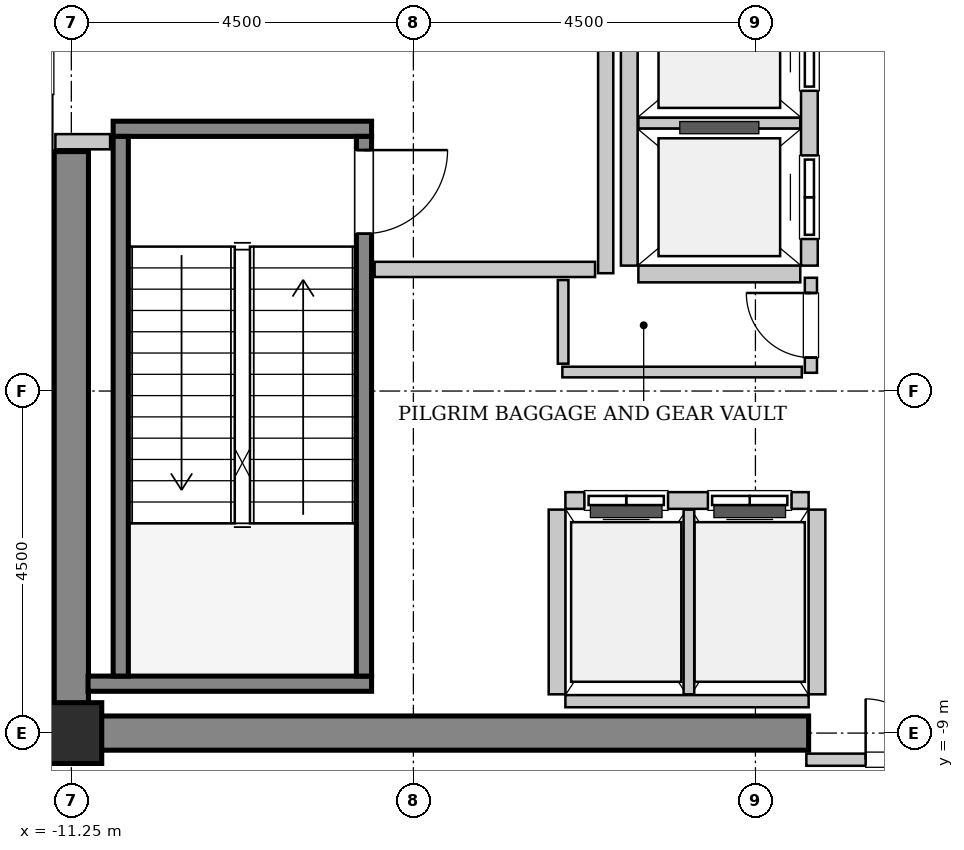
"""IFC4 building model, lengths in metres.
Left out: names, types, materials, properties, quantities, classifications, styles, units other than length and angle.
Written with IfcOpenShell. Run it as: python <this file> out.ifc"""

import sys

from ifc_helpers import new_model, si_unit, direction, frame, frame_2d, origin, origin_2d, place, context, subcontext, project, spatial, rectangle, hollow_rectangle, extrude, source, transform, mapped, element, fill, save


model = new_model("IFC4")
c1 = context("Model", 3, precision=1e-05, world=origin(), true_north=direction((0.0, 1.0)))
c2 = subcontext(c1, "Body", "Model", "MODEL_VIEW")
j1 = project(units=[si_unit("LENGTHUNIT", "METRE"), si_unit("PLANEANGLEUNIT", "RADIAN")], contexts=[c1])
p1 = place(None, origin())
s1 = spatial("IfcSite", under=j1, at=p1, CompositionType="ELEMENT")
p2 = place(p1, origin())
s2 = spatial("IfcBuilding", under=s1, at=p2, CompositionType="ELEMENT")
p3 = place(p2, frame((0.0, 0.0, 259.8)))
s3 = spatial("IfcBuildingStorey", under=s2, at=p3, CompositionType="ELEMENT", Elevation=259.8)
m1 = source(origin(), c2, "Body", "SweptSolid", [
    extrude(rectangle(XDim=9.925, YDim=0.45, at=frame_2d((4.962, 0.0))), origin(), (0.0, 0.0, 1.0), 4.8),
])
p4 = place(p3, frame((-11.475, -9.0, 0.0), z_axis=(0.0, 0.0, 1.0), x_axis=(1.0, 0.0, 0.0)))
e1 = element("IfcWall", 1, at=p4, inside=s3, PredefinedType="SHEAR", context=c2, shape_type="MappedRepresentation", body=[
    mapped(m1, transform((0.0, 0.0, 0.0), x_axis=(1.0, 0.0, 0.0), y_axis=(0.0, 1.0, 0.0), z_axis=(0.0, 0.0, 1.0), scale=1.0)),
])
m2 = source(origin(), c2, "Body", "SweptSolid", [
    extrude(rectangle(XDim=7.425, YDim=0.45, at=frame_2d((3.712, 0.0))), origin(), (0.0, 0.0, 1.0), 4.8),
])
p5 = place(p3, frame((-11.25, -8.775, 0.0), z_axis=(0.0, 0.0, 1.0), x_axis=(0.0, 1.0, 0.0)))
e2 = element("IfcWall", 2, at=p5, inside=s3, PredefinedType="SHEAR", context=c2, shape_type="MappedRepresentation", body=[
    mapped(m2, transform((0.0, 0.0, 0.0), x_axis=(1.0, 0.0, 0.0), y_axis=(0.0, 1.0, 0.0), z_axis=(0.0, 0.0, 1.0), scale=1.0)),
])
m3 = source(origin(), c2, "Body", "SweptSolid", [
    extrude(hollow_rectangle(XDim=0.8, YDim=0.8, WallThickness=0.04, InnerFilletRadius=0.04, OuterFilletRadius=0.08, at=origin_2d()), origin(), (0.0, 0.0, 1.0), 4.8),
])
p6 = place(p3, frame((-11.25, -9.0, 0.0), z_axis=(0.0, 0.0, 1.0), x_axis=(1.0, 0.0, 0.0)))
e3 = element("IfcColumn", 3, at=p6, inside=s3, PredefinedType="COLUMN", context=c2, shape_type="MappedRepresentation", body=[
    mapped(m3, transform((0.0, 0.0, 0.0), x_axis=(1.0, 0.0, 0.0), y_axis=(0.0, 1.0, 0.0), z_axis=(0.0, 0.0, 1.0), scale=1.0)),
])
m4 = source(origin(), c2, "Body", "SweptSolid", [
    extrude(rectangle(XDim=3.4, YDim=0.2, at=frame_2d((1.7, 0.0))), origin(), (0.0, 0.0, 1.0), 4.8),
])
p7 = place(p3, frame((-10.7, -1.05, 0.0), z_axis=(0.0, 0.0, 1.0), x_axis=(1.0, 0.0, 0.0)))
e4 = element("IfcWall", 4, at=p7, inside=s3, PredefinedType="SOLIDWALL", context=c2, shape_type="MappedRepresentation", body=[
    mapped(m4, transform((0.0, 0.0, 0.0), x_axis=(1.0, 0.0, 0.0), y_axis=(0.0, 1.0, 0.0), z_axis=(0.0, 0.0, 1.0), scale=1.0)),
])
m5 = source(origin(), c2, "Body", "SweptSolid", [
    extrude(rectangle(XDim=3.73, YDim=0.2, at=frame_2d((1.865, 0.0))), origin(), (0.0, 0.0, 1.0), 4.8),
])
p8 = place(p3, frame((-11.03, -8.35, 0.0), z_axis=(0.0, 0.0, 1.0), x_axis=(1.0, 0.0, 0.0)))
e5 = element("IfcWall", 5, at=p8, inside=s3, PredefinedType="SOLIDWALL", context=c2, shape_type="MappedRepresentation", body=[
    mapped(m5, transform((0.0, 0.0, 0.0), x_axis=(1.0, 0.0, 0.0), y_axis=(0.0, 1.0, 0.0), z_axis=(0.0, 0.0, 1.0), scale=1.0)),
])
m6 = source(origin(), c2, "Body", "SweptSolid", [
    extrude(rectangle(XDim=7.1, YDim=0.2, at=frame_2d((3.55, 0.0))), origin(), (0.0, 0.0, 1.0), 4.8),
])
p9 = place(p3, frame((-10.6, -1.15, 0.0), z_axis=(0.0, 0.0, 1.0), x_axis=(0.0, -1.0, 0.0)))
e6 = element("IfcWall", 6, at=p9, inside=s3, PredefinedType="SOLIDWALL", context=c2, shape_type="MappedRepresentation", body=[
    mapped(m6, transform((0.0, 0.0, 0.0), x_axis=(1.0, 0.0, 0.0), y_axis=(0.0, 1.0, 0.0), z_axis=(0.0, 0.0, 1.0), scale=1.0)),
])
p10 = place(p3, frame((-7.4, -1.15, 0.0), z_axis=(0.0, 0.0, 1.0), x_axis=(0.0, -1.0, 0.0)))
e7 = element("IfcWall", 7, at=p10, inside=s3, PredefinedType="SOLIDWALL", context=c2, shape_type="MappedRepresentation", body=[
    mapped(m6, transform((0.0, 0.0, 0.0), x_axis=(1.0, 0.0, 0.0), y_axis=(0.0, 1.0, 0.0), z_axis=(0.0, 0.0, 1.0), scale=1.0)),
])
p11 = place(p10, frame((0.18, 0.0, 0.0)))
e8 = element("IfcOpeningElement", 8, at=p11, cuts=e7, PredefinedType="OPENING", context=c2, shape_type="SweptSolid", body=[
    extrude(rectangle(XDim=1.1, YDim=2.15, at=frame_2d((0.55, 1.075))), frame((0.0, 0.11, 0.0), z_axis=(0.0, -1.0, 0.0), x_axis=(1.0, 0.0, 0.0)), (0.0, 0.0, 1.0), 0.22),
])
m7 = source(origin(), c2, "Body", "SweptSolid", [
    extrude(rectangle(XDim=3.2, YDim=0.22, at=frame_2d((1.6, 0.0))), origin(), (0.0, 0.0, 1.0), 4.535),
])
p12 = place(p3, frame((-1.55, -5.94, 0.0), z_axis=(0.0, 0.0, 1.0), x_axis=(-1.0, 0.0, 0.0)))
e9 = element("IfcWall", 9, at=p12, inside=s3, PredefinedType="SOLIDWALL", context=c2, shape_type="MappedRepresentation", body=[
    mapped(m7, transform((0.0, 0.0, 0.0), x_axis=(1.0, 0.0, 0.0), y_axis=(0.0, 1.0, 0.0), z_axis=(0.0, 0.0, 1.0), scale=1.0)),
])
p13 = place(p12, frame((1.85, 0.0, 0.0)))
e10 = element("IfcOpeningElement", 10, at=p13, cuts=e9, PredefinedType="OPENING", context=c2, shape_type="SweptSolid", body=[
    extrude(rectangle(XDim=1.1, YDim=2.2, at=frame_2d((0.55, 1.1))), frame((0.0, 0.12, 0.0), z_axis=(0.0, -1.0, 0.0), x_axis=(1.0, 0.0, 0.0)), (0.0, 0.0, 1.0), 0.24),
])
p14 = place(p12, frame((0.225, 0.0, 0.0)))
e11 = element("IfcOpeningElement", 11, at=p14, cuts=e9, PredefinedType="OPENING", context=c2, shape_type="SweptSolid", body=[
    extrude(rectangle(XDim=1.1, YDim=2.2, at=frame_2d((0.55, 1.1))), frame((0.0, 0.12, 0.0), z_axis=(0.0, -1.0, 0.0), x_axis=(1.0, 0.0, 0.0)), (0.0, 0.0, 1.0), 0.24),
])
m8 = source(origin(), c2, "Body", "SweptSolid", [
    extrude(rectangle(XDim=3.2, YDim=0.16, at=frame_2d((1.6, 0.0))), origin(), (0.0, 0.0, 1.0), 3.625),
])
p15 = place(p3, frame((-4.75, -8.58, 0.0), z_axis=(0.0, 0.0, 1.0), x_axis=(1.0, 0.0, 0.0)))
e12 = element("IfcWall", 12, at=p15, inside=s3, PredefinedType="PARTITIONING", context=c2, shape_type="MappedRepresentation", body=[
    mapped(m8, transform((0.0, 0.0, 0.0), x_axis=(1.0, 0.0, 0.0), y_axis=(0.0, 1.0, 0.0), z_axis=(0.0, 0.0, 1.0), scale=1.0)),
])
m9 = source(origin(), c2, "Body", "SweptSolid", [
    extrude(rectangle(XDim=2.43, YDim=0.22, at=frame_2d((1.215, 0.0))), origin(), (0.0, 0.0, 1.0), 4.535),
])
p16 = place(p3, frame((-4.86, -6.06, 0.0), z_axis=(0.0, 0.0, 1.0), x_axis=(0.0, -1.0, 0.0)))
e13 = element("IfcWall", 13, at=p16, inside=s3, PredefinedType="SOLIDWALL", context=c2, shape_type="MappedRepresentation", body=[
    mapped(m9, transform((0.0, 0.0, 0.0), x_axis=(1.0, 0.0, 0.0), y_axis=(0.0, 1.0, 0.0), z_axis=(0.0, 0.0, 1.0), scale=1.0)),
])
m10 = source(origin(), c2, "Body", "SweptSolid", [
    extrude(rectangle(XDim=2.43, YDim=0.14, at=frame_2d((1.215, 0.0))), origin(), (0.0, 0.0, 1.0), 4.535),
])
p17 = place(p3, frame((-3.125, -8.49, 0.0), z_axis=(0.0, 0.0, 1.0), x_axis=(0.0, 1.0, 0.0)))
e14 = element("IfcWall", 14, at=p17, inside=s3, PredefinedType="PARTITIONING", context=c2, shape_type="MappedRepresentation", body=[
    mapped(m10, transform((0.0, 0.0, 0.0), x_axis=(1.0, 0.0, 0.0), y_axis=(0.0, 1.0, 0.0), z_axis=(0.0, 0.0, 1.0), scale=1.0)),
])
p18 = place(p3, frame((-1.44, -8.49, 0.0), z_axis=(0.0, 0.0, 1.0), x_axis=(0.0, 1.0, 0.0)))
e15 = element("IfcWall", 15, at=p18, inside=s3, PredefinedType="SOLIDWALL", context=c2, shape_type="MappedRepresentation", body=[
    mapped(m9, transform((0.0, 0.0, 0.0), x_axis=(1.0, 0.0, 0.0), y_axis=(0.0, 1.0, 0.0), z_axis=(0.0, 0.0, 1.0), scale=1.0)),
])
m11 = source(origin(), c2, "Body", "SweptSolid", [
    extrude(rectangle(XDim=5.7, YDim=0.22, at=frame_2d((2.85, 0.0))), origin(), (0.0, 0.0, 1.0), 4.535),
])
p19 = place(p3, frame((-1.54, -2.85, 0.0), z_axis=(0.0, 0.0, 1.0), x_axis=(0.0, 1.0, 0.0)))
e16 = element("IfcWall", 16, at=p19, inside=s3, PredefinedType="SOLIDWALL", context=c2, shape_type="MappedRepresentation", body=[
    mapped(m11, transform((0.0, 0.0, 0.0), x_axis=(1.0, 0.0, 0.0), y_axis=(0.0, 1.0, 0.0), z_axis=(0.0, 0.0, 1.0), scale=1.0)),
])
p20 = place(p19, frame((0.35, 0.0, 0.0)))
e17 = element("IfcOpeningElement", 17, at=p20, cuts=e16, PredefinedType="OPENING", context=c2, shape_type="SweptSolid", body=[
    extrude(rectangle(XDim=1.1, YDim=2.2, at=frame_2d((0.55, 1.1))), frame((0.0, 0.12, 0.0), z_axis=(0.0, -1.0, 0.0), x_axis=(1.0, 0.0, 0.0)), (0.0, 0.0, 1.0), 0.24),
])
p21 = place(p19, frame((2.3, 0.0, 0.0)))
e18 = element("IfcOpeningElement", 18, at=p21, cuts=e16, PredefinedType="OPENING", context=c2, shape_type="SweptSolid", body=[
    extrude(rectangle(XDim=1.1, YDim=2.2, at=frame_2d((0.55, 1.1))), frame((0.0, 0.12, 0.0), z_axis=(0.0, -1.0, 0.0), x_axis=(1.0, 0.0, 0.0)), (0.0, 0.0, 1.0), 0.24),
])
p22 = place(p19, frame((4.25, 0.0, 0.0)))
e19 = element("IfcOpeningElement", 19, at=p22, cuts=e16, PredefinedType="OPENING", context=c2, shape_type="SweptSolid", body=[
    extrude(rectangle(XDim=1.1, YDim=2.2, at=frame_2d((0.55, 1.1))), frame((0.0, 0.12, 0.0), z_axis=(0.0, -1.0, 0.0), x_axis=(1.0, 0.0, 0.0)), (0.0, 0.0, 1.0), 0.24),
])
p23 = place(p3, frame((-3.91, 2.85, 0.0), z_axis=(0.0, 0.0, 1.0), x_axis=(0.0, -1.0, 0.0)))
e20 = element("IfcWall", 20, at=p23, inside=s3, PredefinedType="SOLIDWALL", context=c2, shape_type="MappedRepresentation", body=[
    mapped(m11, transform((0.0, 0.0, 0.0), x_axis=(1.0, 0.0, 0.0), y_axis=(0.0, 1.0, 0.0), z_axis=(0.0, 0.0, 1.0), scale=1.0)),
])
m12 = source(origin(), c2, "Body", "SweptSolid", [
    extrude(rectangle(XDim=2.13, YDim=0.22, at=frame_2d((1.065, 0.0))), origin(), (0.0, 0.0, 1.0), 4.535),
])
p24 = place(p3, frame((-3.79, -2.96, 0.0), z_axis=(0.0, 0.0, 1.0), x_axis=(1.0, 0.0, 0.0)))
e21 = element("IfcWall", 21, at=p24, inside=s3, PredefinedType="SOLIDWALL", context=c2, shape_type="MappedRepresentation", body=[
    mapped(m12, transform((0.0, 0.0, 0.0), x_axis=(1.0, 0.0, 0.0), y_axis=(0.0, 1.0, 0.0), z_axis=(0.0, 0.0, 1.0), scale=1.0)),
])
m13 = source(origin(), c2, "Body", "SweptSolid", [
    extrude(rectangle(XDim=2.13, YDim=0.14, at=frame_2d((1.065, 0.0))), origin(), (0.0, 0.0, 1.0), 4.535),
])
p25 = place(p3, frame((-3.79, -0.975, 0.0), z_axis=(0.0, 0.0, 1.0), x_axis=(1.0, 0.0, 0.0)))
e22 = element("IfcWall", 22, at=p25, inside=s3, PredefinedType="PARTITIONING", context=c2, shape_type="MappedRepresentation", body=[
    mapped(m13, transform((0.0, 0.0, 0.0), x_axis=(1.0, 0.0, 0.0), y_axis=(0.0, 1.0, 0.0), z_axis=(0.0, 0.0, 1.0), scale=1.0)),
])
m14 = source(origin(), c2, "Body", "SweptSolid", [
    extrude(rectangle(XDim=5.9, YDim=0.2, at=frame_2d((2.95, 0.0))), origin(), (0.0, 0.0, 1.0), 4.535),
])
p26 = place(p3, frame((-4.22, -2.95, 0.0), z_axis=(0.0, 0.0, 1.0), x_axis=(0.0, 1.0, 0.0)))
e23 = element("IfcWall", 23, at=p26, inside=s3, PredefinedType="PARTITIONING", context=c2, shape_type="MappedRepresentation", body=[
    mapped(m14, transform((0.0, 0.0, 0.0), x_axis=(1.0, 0.0, 0.0), y_axis=(0.0, 1.0, 0.0), z_axis=(0.0, 0.0, 1.0), scale=1.0)),
])
m15 = source(origin(), c2, "Body", "SweptSolid", [
    extrude(rectangle(XDim=2.9, YDim=0.2, at=frame_2d((1.45, 0.0))), origin(), (0.0, 0.0, 1.0), 4.535),
])
p27 = place(p3, frame((-7.26, -2.9, 0.0), z_axis=(0.0, 0.0, 1.0), x_axis=(1.0, 0.0, 0.0)))
e24 = element("IfcWall", 24, at=p27, inside=s3, PredefinedType="PARTITIONING", context=c2, shape_type="MappedRepresentation", body=[
    mapped(m15, transform((0.0, 0.0, 0.0), x_axis=(1.0, 0.0, 0.0), y_axis=(0.0, 1.0, 0.0), z_axis=(0.0, 0.0, 1.0), scale=1.0)),
])
m16 = source(origin(), c2, "Body", "SweptSolid", [
    extrude(rectangle(XDim=0.72, YDim=0.2, at=frame_2d((0.36, 0.0))), origin(), (0.0, 0.0, 1.0), 4.535),
])
p28 = place(p3, frame((-11.46, -1.22, 0.0), z_axis=(0.0, 0.0, 1.0), x_axis=(1.0, 0.0, 0.0)))
e25 = element("IfcWall", 25, at=p28, inside=s3, PredefinedType="PARTITIONING", context=c2, shape_type="MappedRepresentation", body=[
    mapped(m16, transform((0.0, 0.0, 0.0), x_axis=(1.0, 0.0, 0.0), y_axis=(0.0, 1.0, 0.0), z_axis=(0.0, 0.0, 1.0), scale=1.0)),
])
m17 = source(origin(), c2, "Body", "SweptSolid", [
    extrude(rectangle(XDim=3.16, YDim=0.16, at=frame_2d((1.58, 0.0))), origin(), (0.0, 0.0, 1.0), 3.625),
])
p29 = place(p3, frame((-1.58, -9.35, 0.0), z_axis=(0.0, 0.0, 1.0), x_axis=(1.0, 0.0, 0.0)))
e26 = element("IfcWall", 26, at=p29, inside=s3, PredefinedType="PARTITIONING", context=c2, shape_type="MappedRepresentation", body=[
    mapped(m17, transform((0.0, 0.0, 0.0), x_axis=(1.0, 0.0, 0.0), y_axis=(0.0, 1.0, 0.0), z_axis=(0.0, 0.0, 1.0), scale=1.0)),
])
p30 = place(p29, frame((0.78, 0.0, 0.0)))
e27 = element("IfcOpeningElement", 27, at=p30, cuts=e26, PredefinedType="OPENING", context=c2, shape_type="SweptSolid", body=[
    extrude(rectangle(XDim=1.6, YDim=2.3, at=frame_2d((0.8, 1.15))), frame((0.0, 0.09, 0.0), z_axis=(0.0, -1.0, 0.0), x_axis=(1.0, 0.0, 0.0)), (0.0, 0.0, 1.0), 0.18),
])
m18 = source(origin(), c2, "Body", "SweptSolid", [
    extrude(rectangle(XDim=1.25, YDim=0.16, at=frame_2d((0.625, 0.0))), origin(), (0.0, 0.0, 1.0), 4.535),
])
p31 = place(p3, frame((-1.52, -4.26, 0.0), z_axis=(0.0, 0.0, 1.0), x_axis=(0.0, 1.0, 0.0)))
e28 = element("IfcWall", 28, at=p31, inside=s3, PredefinedType="PARTITIONING", context=c2, shape_type="MappedRepresentation", body=[
    mapped(m18, transform((0.0, 0.0, 0.0), x_axis=(1.0, 0.0, 0.0), y_axis=(0.0, 1.0, 0.0), z_axis=(0.0, 0.0, 1.0), scale=1.0)),
])
p32 = place(p31, frame((0.2, 0.0, 0.0)))
e29 = element("IfcOpeningElement", 29, at=p32, cuts=e28, PredefinedType="OPENING", context=c2, shape_type="SweptSolid", body=[
    extrude(rectangle(XDim=0.85, YDim=2.1, at=frame_2d((0.425, 1.05))), frame((0.0, 0.09, 0.0), z_axis=(0.0, -1.0, 0.0), x_axis=(1.0, 0.0, 0.0)), (0.0, 0.0, 1.0), 0.18),
])
m19 = source(origin(), c2, "Body", "SweptSolid", [
    extrude(rectangle(XDim=3.15, YDim=0.14, at=frame_2d((1.575, 0.0))), origin(), (0.0, 0.0, 1.0), 4.535),
])
p33 = place(p3, frame((-4.79, -4.25, 0.0), z_axis=(0.0, 0.0, 1.0), x_axis=(1.0, 0.0, 0.0)))
e30 = element("IfcWall", 30, at=p33, inside=s3, PredefinedType="PARTITIONING", context=c2, shape_type="MappedRepresentation", body=[
    mapped(m19, transform((0.0, 0.0, 0.0), x_axis=(1.0, 0.0, 0.0), y_axis=(0.0, 1.0, 0.0), z_axis=(0.0, 0.0, 1.0), scale=1.0)),
])
m20 = source(origin(), c2, "Body", "SweptSolid", [
    extrude(rectangle(XDim=1.1, YDim=0.14, at=frame_2d((0.55, 0.0))), origin(), (0.0, 0.0, 1.0), 4.535),
])
p34 = place(p3, frame((-4.78, -4.14, 0.0), z_axis=(0.0, 0.0, 1.0), x_axis=(0.0, 1.0, 0.0)))
e31 = element("IfcWall", 31, at=p34, inside=s3, PredefinedType="PARTITIONING", context=c2, shape_type="MappedRepresentation", body=[
    mapped(m20, transform((0.0, 0.0, 0.0), x_axis=(1.0, 0.0, 0.0), y_axis=(0.0, 1.0, 0.0), z_axis=(0.0, 0.0, 1.0), scale=1.0)),
])
m21 = source(origin(), c2, "Body", "SweptSolid", [
    extrude(rectangle(XDim=1.1, YDim=2.15, at=frame_2d((0.55, 1.075))), frame((0.0, 0.025, 0.0), z_axis=(0.0, -1.0, 0.0), x_axis=(1.0, 0.0, 0.0)), (0.0, 0.0, 1.0), 0.05),
])
p35 = place(p11, origin())
e32 = element("IfcDoor", 32, at=p35, inside=s3, OperationType="SINGLE_SWING_LEFT", PredefinedType="DOOR", context=c2, shape_type="MappedRepresentation", body=[
    mapped(m21, transform((0.0, 0.0, 0.0), x_axis=(1.0, 0.0, 0.0), y_axis=(0.0, 1.0, 0.0), z_axis=(0.0, 0.0, 1.0), scale=1.0)),
])
fill(e8, e32)
m22 = source(origin(), c2, "Body", "SweptSolid", [
    extrude(rectangle(XDim=1.1, YDim=2.2, at=frame_2d((0.55, 1.1))), frame((0.0, 0.025, 0.0), z_axis=(0.0, -1.0, 0.0), x_axis=(1.0, 0.0, 0.0)), (0.0, 0.0, 1.0), 0.05),
])
p36 = place(p13, origin())
e33 = element("IfcDoor", 33, at=p36, inside=s3, OperationType="DOUBLE_DOOR_SLIDING", PredefinedType="DOOR", context=c2, shape_type="MappedRepresentation", body=[
    mapped(m22, transform((0.0, 0.0, 0.0), x_axis=(1.0, 0.0, 0.0), y_axis=(0.0, 1.0, 0.0), z_axis=(0.0, 0.0, 1.0), scale=1.0)),
])
fill(e10, e33)
p37 = place(p14, origin())
e34 = element("IfcDoor", 34, at=p37, inside=s3, OperationType="DOUBLE_DOOR_SLIDING", PredefinedType="DOOR", context=c2, shape_type="MappedRepresentation", body=[
    mapped(m22, transform((0.0, 0.0, 0.0), x_axis=(1.0, 0.0, 0.0), y_axis=(0.0, 1.0, 0.0), z_axis=(0.0, 0.0, 1.0), scale=1.0)),
])
fill(e11, e34)
p38 = place(p20, origin())
e35 = element("IfcDoor", 35, at=p38, inside=s3, OperationType="DOUBLE_DOOR_SLIDING", PredefinedType="DOOR", context=c2, shape_type="MappedRepresentation", body=[
    mapped(m22, transform((0.0, 0.0, 0.0), x_axis=(1.0, 0.0, 0.0), y_axis=(0.0, 1.0, 0.0), z_axis=(0.0, 0.0, 1.0), scale=1.0)),
])
fill(e17, e35)
p39 = place(p21, origin())
e36 = element("IfcDoor", 36, at=p39, inside=s3, OperationType="DOUBLE_DOOR_SLIDING", PredefinedType="DOOR", context=c2, shape_type="MappedRepresentation", body=[
    mapped(m22, transform((0.0, 0.0, 0.0), x_axis=(1.0, 0.0, 0.0), y_axis=(0.0, 1.0, 0.0), z_axis=(0.0, 0.0, 1.0), scale=1.0)),
])
fill(e18, e36)
m23 = source(origin(), c2, "Body", "SweptSolid", [
    extrude(rectangle(XDim=1.6, YDim=2.3, at=frame_2d((0.8, 1.15))), frame((0.0, 0.025, 0.0), z_axis=(0.0, -1.0, 0.0), x_axis=(1.0, 0.0, 0.0)), (0.0, 0.0, 1.0), 0.05),
])
p40 = place(p30, origin())
e37 = element("IfcDoor", 37, at=p40, inside=s3, OperationType="DOUBLE_DOOR_SINGLE_SWING", PredefinedType="DOOR", context=c2, shape_type="MappedRepresentation", body=[
    mapped(m23, transform((0.0, 0.0, 0.0), x_axis=(1.0, 0.0, 0.0), y_axis=(0.0, 1.0, 0.0), z_axis=(0.0, 0.0, 1.0), scale=1.0)),
])
fill(e27, e37)
m24 = source(origin(), c2, "Body", "SweptSolid", [
    extrude(rectangle(XDim=0.85, YDim=2.1, at=frame_2d((0.425, 1.05))), frame((0.0, 0.025, 0.0), z_axis=(0.0, -1.0, 0.0), x_axis=(1.0, 0.0, 0.0)), (0.0, 0.0, 1.0), 0.05),
])
p41 = place(p32, origin())
e38 = element("IfcDoor", 38, at=p41, inside=s3, OperationType="SINGLE_SWING_RIGHT", PredefinedType="DOOR", context=c2, shape_type="MappedRepresentation", body=[
    mapped(m24, transform((0.0, 0.0, 0.0), x_axis=(1.0, 0.0, 0.0), y_axis=(0.0, 1.0, 0.0), z_axis=(0.0, 0.0, 1.0), scale=1.0)),
])
fill(e29, e38)
save(model, sys.argv[1])
